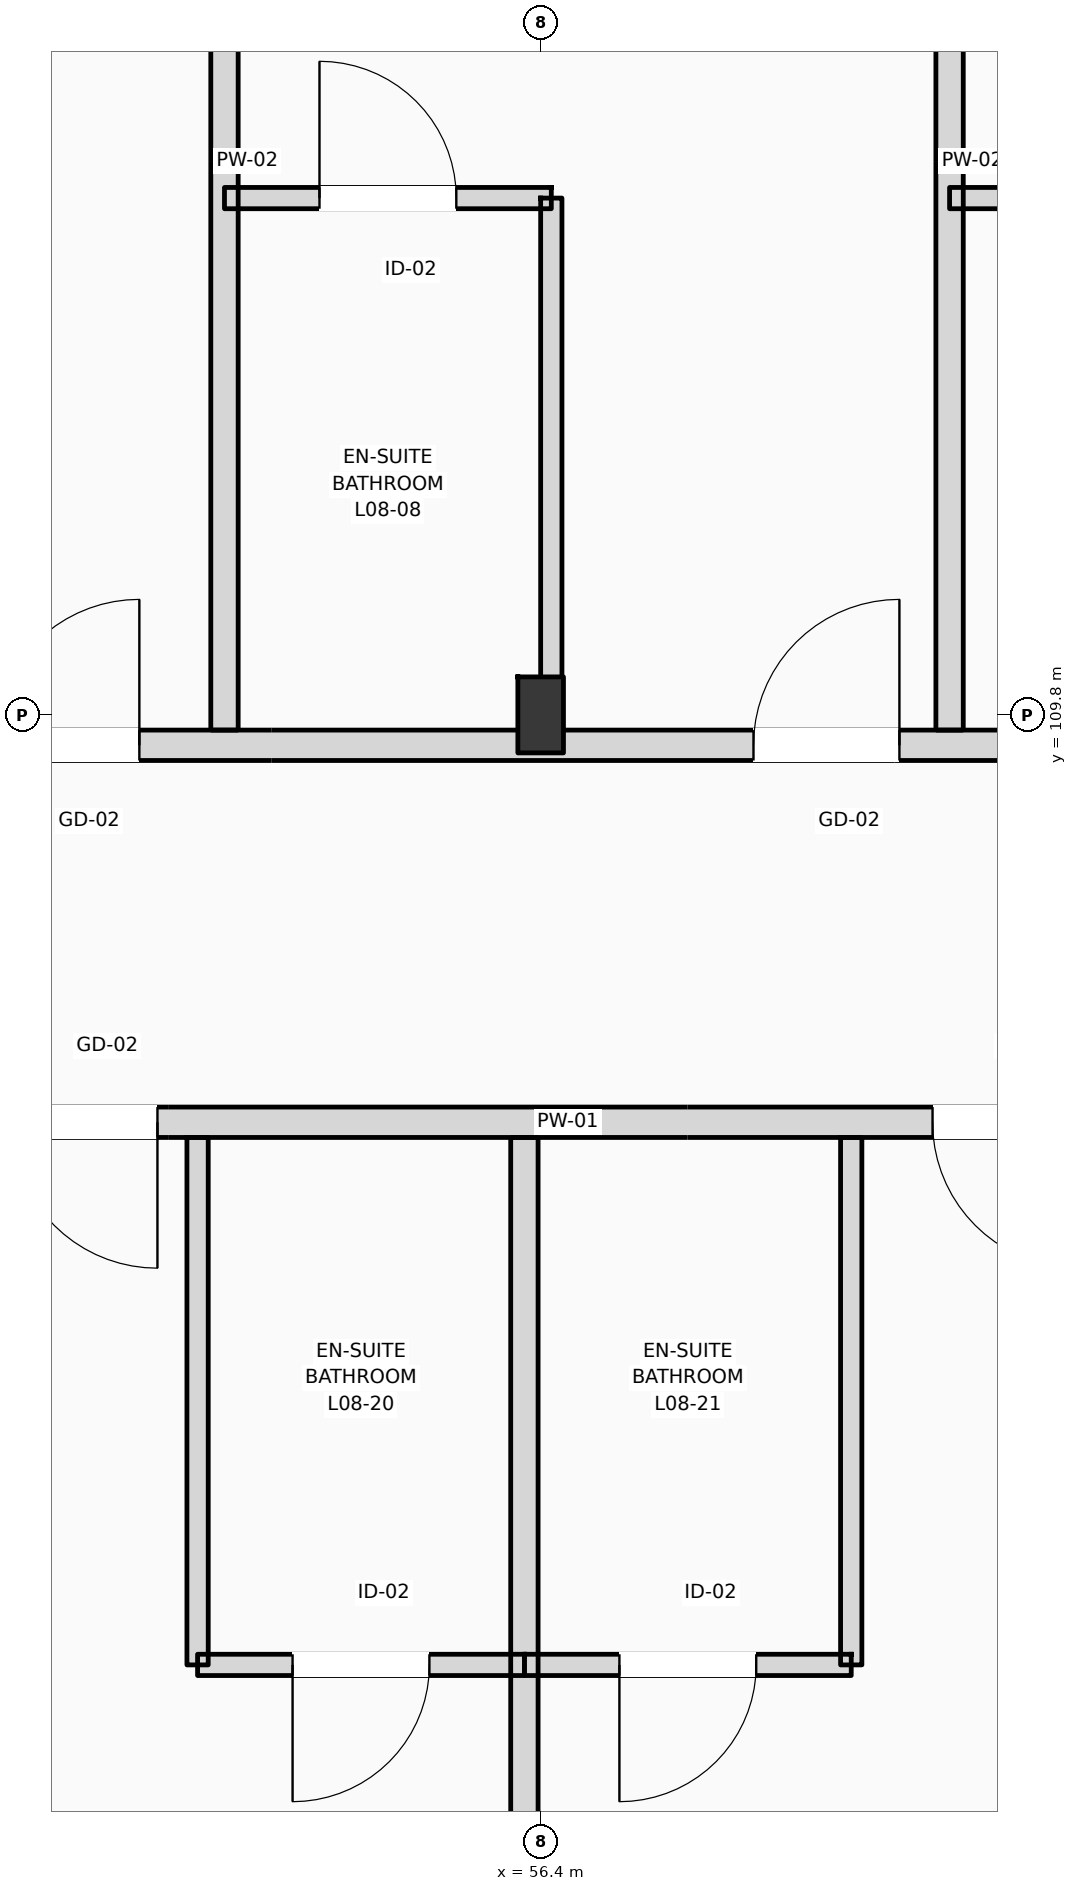
"""IFC4 building model, lengths in metres.
Left out: names, types, materials, properties, quantities, classifications, styles, units other than length and angle.
Written with IfcOpenShell. Run it as: python <this file> out.ifc"""

import sys

from ifc_helpers import new_model, si_unit, direction, frame, frame_2d, origin, origin_2d, place, context, subcontext, project, spatial, rectangle, i_section, extrude, element, fill, save


model = new_model("IFC4")
c1 = context("Model", 3, precision=1e-05, world=origin(), true_north=direction((0.0, 1.0)))
c2 = subcontext(c1, "Body", "Model", "MODEL_VIEW")
j1 = project(units=[si_unit("LENGTHUNIT", "METRE"), si_unit("PLANEANGLEUNIT", "RADIAN")], contexts=[c1])
p1 = place(None, origin())
s1 = spatial("IfcSite", under=j1, at=p1, CompositionType="ELEMENT")
p2 = place(p1, origin())
s2 = spatial("IfcBuilding", under=s1, at=p2, CompositionType="ELEMENT")
p3 = place(p2, frame((0.0, 0.0, 35.4)))
s3 = spatial("IfcBuildingStorey", under=s2, at=p3, CompositionType="ELEMENT", Elevation=35.4)
p4 = place(p3, frame((56.4, 109.8, 0.0), z_axis=(0.0, 0.0, 1.0), x_axis=(1.0, 0.0, 0.0)))
e1 = element("IfcColumn", 1, at=p4, inside=s3, PredefinedType="COLUMN", context=c2, shape_type="SweptSolid", body=[
    extrude(i_section(OverallWidth=0.3, OverallDepth=0.5, WebThickness=0.014, FlangeThickness=0.028, FilletRadius=0.027, at=origin_2d()), origin(), (0.0, 0.0, 1.0), 3.6),
])
p5 = place(p3, frame((10.65, 109.6, 0.0), z_axis=(0.0, 0.0, 1.0), x_axis=(1.0, 0.0, 0.0)))
e2 = element("IfcWall", 2, at=p5, inside=s3, PredefinedType="PARTITIONING", context=c2, shape_type="SweptSolid", body=[
    extrude(rectangle(XDim=84.61, YDim=0.2, at=frame_2d((42.305, 0.0))), origin(), (0.0, 0.0, 1.0), 2.82),
])
p6 = place(p5, frame((12.675, 0.0, 0.0)))
e3 = element("IfcOpeningElement", 3, at=p6, cuts=e2, PredefinedType="OPENING", context=c2, shape_type="SweptSolid", body=[
    extrude(rectangle(XDim=1.02, YDim=2.2, at=frame_2d((0.51, 1.1))), frame((0.0, 0.11, 0.0), z_axis=(0.0, -1.0, 0.0), x_axis=(1.0, 0.0, 0.0)), (0.0, 0.0, 1.0), 0.22),
])
p7 = place(p5, frame((19.62, 0.0, 0.0)))
e4 = element("IfcOpeningElement", 4, at=p7, cuts=e2, PredefinedType="OPENING", context=c2, shape_type="SweptSolid", body=[
    extrude(rectangle(XDim=1.02, YDim=2.2, at=frame_2d((0.51, 1.1))), frame((0.0, 0.11, 0.0), z_axis=(0.0, -1.0, 0.0), x_axis=(1.0, 0.0, 0.0)), (0.0, 0.0, 1.0), 0.22),
])
p8 = place(p5, frame((24.12, 0.0, 0.0)))
e5 = element("IfcOpeningElement", 5, at=p8, cuts=e2, PredefinedType="OPENING", context=c2, shape_type="SweptSolid", body=[
    extrude(rectangle(XDim=1.02, YDim=2.2, at=frame_2d((0.51, 1.1))), frame((0.0, 0.11, 0.0), z_axis=(0.0, -1.0, 0.0), x_axis=(1.0, 0.0, 0.0)), (0.0, 0.0, 1.0), 0.22),
])
p9 = place(p5, frame((26.47, 0.0, 0.0)))
e6 = element("IfcOpeningElement", 6, at=p9, cuts=e2, PredefinedType="OPENING", context=c2, shape_type="SweptSolid", body=[
    extrude(rectangle(XDim=1.02, YDim=2.2, at=frame_2d((0.51, 1.1))), frame((0.0, 0.11, 0.0), z_axis=(0.0, -1.0, 0.0), x_axis=(1.0, 0.0, 0.0)), (0.0, 0.0, 1.0), 0.22),
])
p10 = place(p5, frame((33.15, 0.0, 0.0)))
e7 = element("IfcOpeningElement", 7, at=p10, cuts=e2, PredefinedType="OPENING", context=c2, shape_type="SweptSolid", body=[
    extrude(rectangle(XDim=0.96, YDim=2.2, at=frame_2d((0.48, 1.1))), frame((0.0, 0.11, 0.0), z_axis=(0.0, -1.0, 0.0), x_axis=(1.0, 0.0, 0.0)), (0.0, 0.0, 1.0), 0.22),
])
p11 = place(p5, frame((35.5, 0.0, 0.0)))
e8 = element("IfcOpeningElement", 8, at=p11, cuts=e2, PredefinedType="OPENING", context=c2, shape_type="SweptSolid", body=[
    extrude(rectangle(XDim=0.96, YDim=2.2, at=frame_2d((0.48, 1.1))), frame((0.0, 0.11, 0.0), z_axis=(0.0, -1.0, 0.0), x_axis=(1.0, 0.0, 0.0)), (0.0, 0.0, 1.0), 0.22),
])
p12 = place(p5, frame((42.15, 0.0, 0.0)))
e9 = element("IfcOpeningElement", 9, at=p12, cuts=e2, PredefinedType="OPENING", context=c2, shape_type="SweptSolid", body=[
    extrude(rectangle(XDim=0.96, YDim=2.2, at=frame_2d((0.48, 1.1))), frame((0.0, 0.11, 0.0), z_axis=(0.0, -1.0, 0.0), x_axis=(1.0, 0.0, 0.0)), (0.0, 0.0, 1.0), 0.22),
])
p13 = place(p5, frame((47.15, 0.0, 0.0)))
e10 = element("IfcOpeningElement", 10, at=p13, cuts=e2, PredefinedType="OPENING", context=c2, shape_type="SweptSolid", body=[
    extrude(rectangle(XDim=0.96, YDim=2.2, at=frame_2d((0.48, 1.1))), frame((0.0, 0.11, 0.0), z_axis=(0.0, -1.0, 0.0), x_axis=(1.0, 0.0, 0.0)), (0.0, 0.0, 1.0), 0.22),
])
p14 = place(p5, frame((51.15, 0.0, 0.0)))
e11 = element("IfcOpeningElement", 11, at=p14, cuts=e2, PredefinedType="OPENING", context=c2, shape_type="SweptSolid", body=[
    extrude(rectangle(XDim=0.96, YDim=2.2, at=frame_2d((0.48, 1.1))), frame((0.0, 0.11, 0.0), z_axis=(0.0, -1.0, 0.0), x_axis=(1.0, 0.0, 0.0)), (0.0, 0.0, 1.0), 0.22),
])
p15 = place(p5, frame((55.65, 0.0, 0.0)))
e12 = element("IfcOpeningElement", 12, at=p15, cuts=e2, PredefinedType="OPENING", context=c2, shape_type="SweptSolid", body=[
    extrude(rectangle(XDim=0.96, YDim=2.2, at=frame_2d((0.48, 1.1))), frame((0.0, 0.11, 0.0), z_axis=(0.0, -1.0, 0.0), x_axis=(1.0, 0.0, 0.0)), (0.0, 0.0, 1.0), 0.22),
])
p16 = place(p5, frame((58.0, 0.0, 0.0)))
e13 = element("IfcOpeningElement", 13, at=p16, cuts=e2, PredefinedType="OPENING", context=c2, shape_type="SweptSolid", body=[
    extrude(rectangle(XDim=0.96, YDim=2.2, at=frame_2d((0.48, 1.1))), frame((0.0, 0.11, 0.0), z_axis=(0.0, -1.0, 0.0), x_axis=(1.0, 0.0, 0.0)), (0.0, 0.0, 1.0), 0.22),
])
p17 = place(p5, frame((64.65, 0.0, 0.0)))
e14 = element("IfcOpeningElement", 14, at=p17, cuts=e2, PredefinedType="OPENING", context=c2, shape_type="SweptSolid", body=[
    extrude(rectangle(XDim=0.96, YDim=2.2, at=frame_2d((0.48, 1.1))), frame((0.0, 0.11, 0.0), z_axis=(0.0, -1.0, 0.0), x_axis=(1.0, 0.0, 0.0)), (0.0, 0.0, 1.0), 0.22),
])
p18 = place(p5, frame((66.75, 0.0, 0.0)))
e15 = element("IfcOpeningElement", 15, at=p18, cuts=e2, PredefinedType="OPENING", context=c2, shape_type="SweptSolid", body=[
    extrude(rectangle(XDim=0.96, YDim=2.2, at=frame_2d((0.48, 1.1))), frame((0.0, 0.11, 0.0), z_axis=(0.0, -1.0, 0.0), x_axis=(1.0, 0.0, 0.0)), (0.0, 0.0, 1.0), 0.22),
])
p19 = place(p5, frame((73.65, 0.0, 0.0)))
e16 = element("IfcOpeningElement", 16, at=p19, cuts=e2, PredefinedType="OPENING", context=c2, shape_type="SweptSolid", body=[
    extrude(rectangle(XDim=0.96, YDim=2.2, at=frame_2d((0.48, 1.1))), frame((0.0, 0.11, 0.0), z_axis=(0.0, -1.0, 0.0), x_axis=(1.0, 0.0, 0.0)), (0.0, 0.0, 1.0), 0.22),
])
p20 = place(p5, frame((78.4, 0.0, 0.0)))
e17 = element("IfcOpeningElement", 17, at=p20, cuts=e2, PredefinedType="OPENING", context=c2, shape_type="SweptSolid", body=[
    extrude(rectangle(XDim=0.96, YDim=2.2, at=frame_2d((0.48, 1.1))), frame((0.0, 0.11, 0.0), z_axis=(0.0, -1.0, 0.0), x_axis=(1.0, 0.0, 0.0)), (0.0, 0.0, 1.0), 0.22),
])
p21 = place(p5, frame((80.455, 0.0, 0.0)))
e18 = element("IfcOpeningElement", 18, at=p21, cuts=e2, PredefinedType="OPENING", context=c2, shape_type="SweptSolid", body=[
    extrude(rectangle(XDim=0.96, YDim=2.2, at=frame_2d((0.48, 1.1))), frame((0.0, 0.11, 0.0), z_axis=(0.0, -1.0, 0.0), x_axis=(1.0, 0.0, 0.0)), (0.0, 0.0, 1.0), 0.22),
])
p22 = place(p5, frame((2.716, 0.0, 0.0)))
e19 = element("IfcOpeningElement", 19, at=p22, cuts=e2, PredefinedType="OPENING", context=c2, shape_type="SweptSolid", body=[
    extrude(rectangle(XDim=1.35, YDim=2.25, at=frame_2d((0.675, 1.125))), frame((0.0, 0.11, 0.0), z_axis=(0.0, -1.0, 0.0), x_axis=(1.0, 0.0, 0.0)), (0.0, 0.0, 1.0), 0.22),
])
p23 = place(p5, frame((6.65, 0.0, 0.0)))
e20 = element("IfcOpeningElement", 20, at=p23, cuts=e2, PredefinedType="OPENING", context=c2, shape_type="SweptSolid", body=[
    extrude(rectangle(XDim=1.35, YDim=2.25, at=frame_2d((0.675, 1.125))), frame((0.0, 0.11, 0.0), z_axis=(0.0, -1.0, 0.0), x_axis=(1.0, 0.0, 0.0)), (0.0, 0.0, 1.0), 0.22),
])
p24 = place(p5, frame((10.583, 0.0, 0.0)))
e21 = element("IfcOpeningElement", 21, at=p24, cuts=e2, PredefinedType="OPENING", context=c2, shape_type="SweptSolid", body=[
    extrude(rectangle(XDim=1.35, YDim=2.25, at=frame_2d((0.675, 1.125))), frame((0.0, 0.11, 0.0), z_axis=(0.0, -1.0, 0.0), x_axis=(1.0, 0.0, 0.0)), (0.0, 0.0, 1.0), 0.22),
])
p25 = place(p3, frame((40.76, 107.12, 0.0), z_axis=(0.0, 0.0, 1.0), x_axis=(1.0, 0.0, 0.0)))
e22 = element("IfcWall", 22, at=p25, inside=s3, PredefinedType="PARTITIONING", context=c2, shape_type="SweptSolid", body=[
    extrude(rectangle(XDim=23.44, YDim=0.2, at=frame_2d((11.72, 0.0))), origin(), (0.0, 0.0, 1.0), 3.38),
])
p26 = place(p25, frame((2.629, 0.0, 0.0)))
e23 = element("IfcOpeningElement", 23, at=p26, cuts=e22, PredefinedType="OPENING", context=c2, shape_type="SweptSolid", body=[
    extrude(rectangle(XDim=0.96, YDim=2.2, at=frame_2d((0.48, 1.1))), frame((0.0, 0.11, 0.0), z_axis=(0.0, -1.0, 0.0), x_axis=(1.0, 0.0, 0.0)), (0.0, 0.0, 1.0), 0.22),
])
p27 = place(p25, frame((4.343, 0.0, 0.0)))
e24 = element("IfcOpeningElement", 24, at=p27, cuts=e22, PredefinedType="OPENING", context=c2, shape_type="SweptSolid", body=[
    extrude(rectangle(XDim=0.96, YDim=2.2, at=frame_2d((0.48, 1.1))), frame((0.0, 0.11, 0.0), z_axis=(0.0, -1.0, 0.0), x_axis=(1.0, 0.0, 0.0)), (0.0, 0.0, 1.0), 0.22),
])
p28 = place(p25, frame((10.401, 0.0, 0.0)))
e25 = element("IfcOpeningElement", 25, at=p28, cuts=e22, PredefinedType="OPENING", context=c2, shape_type="SweptSolid", body=[
    extrude(rectangle(XDim=0.96, YDim=2.2, at=frame_2d((0.48, 1.1))), frame((0.0, 0.11, 0.0), z_axis=(0.0, -1.0, 0.0), x_axis=(1.0, 0.0, 0.0)), (0.0, 0.0, 1.0), 0.22),
])
p29 = place(p25, frame((12.159, 0.0, 0.0)))
e26 = element("IfcOpeningElement", 26, at=p29, cuts=e22, PredefinedType="OPENING", context=c2, shape_type="SweptSolid", body=[
    extrude(rectangle(XDim=0.96, YDim=2.2, at=frame_2d((0.48, 1.1))), frame((0.0, 0.11, 0.0), z_axis=(0.0, -1.0, 0.0), x_axis=(1.0, 0.0, 0.0)), (0.0, 0.0, 1.0), 0.22),
])
p30 = place(p25, frame((18.218, 0.0, 0.0)))
e27 = element("IfcOpeningElement", 27, at=p30, cuts=e22, PredefinedType="OPENING", context=c2, shape_type="SweptSolid", body=[
    extrude(rectangle(XDim=0.96, YDim=2.2, at=frame_2d((0.48, 1.1))), frame((0.0, 0.11, 0.0), z_axis=(0.0, -1.0, 0.0), x_axis=(1.0, 0.0, 0.0)), (0.0, 0.0, 1.0), 0.22),
])
p31 = place(p25, frame((20.021, 0.0, 0.0)))
e28 = element("IfcOpeningElement", 28, at=p31, cuts=e22, PredefinedType="OPENING", context=c2, shape_type="SweptSolid", body=[
    extrude(rectangle(XDim=0.96, YDim=2.2, at=frame_2d((0.48, 1.1))), frame((0.0, 0.11, 0.0), z_axis=(0.0, -1.0, 0.0), x_axis=(1.0, 0.0, 0.0)), (0.0, 0.0, 1.0), 0.22),
])
p32 = place(p3, frame((54.32, 109.7, 0.0), z_axis=(0.0, 0.0, 1.0), x_axis=(0.0, 1.0, 0.0)))
e29 = element("IfcWall", 29, at=p32, inside=s3, PredefinedType="PARTITIONING", context=c2, shape_type="SweptSolid", body=[
    extrude(rectangle(XDim=8.15, YDim=0.18, at=frame_2d((4.075, 0.0))), origin(), (0.0, 0.0, 1.0), 3.38),
])
p33 = place(p3, frame((59.09, 109.7, 0.0), z_axis=(0.0, 0.0, 1.0), x_axis=(0.0, 1.0, 0.0)))
e30 = element("IfcWall", 30, at=p33, inside=s3, PredefinedType="PARTITIONING", context=c2, shape_type="SweptSolid", body=[
    extrude(rectangle(XDim=8.15, YDim=0.18, at=frame_2d((4.075, 0.0))), origin(), (0.0, 0.0, 1.0), 3.07),
])
p34 = place(p3, frame((56.47, 109.7, 0.0), z_axis=(0.0, 0.0, 1.0), x_axis=(0.0, 1.0, 0.0)))
e31 = element("IfcWall", 31, at=p34, inside=s3, PredefinedType="PARTITIONING", context=c2, shape_type="SweptSolid", body=[
    extrude(rectangle(XDim=3.5, YDim=0.14, at=frame_2d((1.75, 0.0))), origin(), (0.0, 0.0, 1.0), 3.01),
])
p35 = place(p3, frame((54.32, 113.2, 0.0), z_axis=(0.0, 0.0, 1.0), x_axis=(1.0, 0.0, 0.0)))
e32 = element("IfcWall", 32, at=p35, inside=s3, PredefinedType="PARTITIONING", context=c2, shape_type="SweptSolid", body=[
    extrude(rectangle(XDim=2.15, YDim=0.14, at=frame_2d((1.075, 0.0))), origin(), (0.0, 0.0, 1.0), 3.38),
])
p36 = place(p35, frame((0.625, 0.0, 0.0)))
e33 = element("IfcOpeningElement", 33, at=p36, cuts=e32, PredefinedType="OPENING", context=c2, shape_type="SweptSolid", body=[
    extrude(rectangle(XDim=0.9, YDim=2.1, at=frame_2d((0.45, 1.05))), frame((0.0, 0.08, 0.0), z_axis=(0.0, -1.0, 0.0), x_axis=(1.0, 0.0, 0.0)), (0.0, 0.0, 1.0), 0.16),
])
p37 = place(p3, frame((59.09, 113.2, 0.0), z_axis=(0.0, 0.0, 1.0), x_axis=(1.0, 0.0, 0.0)))
e34 = element("IfcWall", 34, at=p37, inside=s3, PredefinedType="PARTITIONING", context=c2, shape_type="SweptSolid", body=[
    extrude(rectangle(XDim=2.15, YDim=0.14, at=frame_2d((1.075, 0.0))), origin(), (0.0, 0.0, 1.0), 3.38),
])
p38 = place(p37, frame((0.625, 0.0, 0.0)))
e35 = element("IfcOpeningElement", 35, at=p38, cuts=e34, PredefinedType="OPENING", context=c2, shape_type="SweptSolid", body=[
    extrude(rectangle(XDim=0.9, YDim=2.1, at=frame_2d((0.45, 1.05))), frame((0.0, 0.08, 0.0), z_axis=(0.0, -1.0, 0.0), x_axis=(1.0, 0.0, 0.0)), (0.0, 0.0, 1.0), 0.16),
])
p39 = place(p3, frame((56.293, 96.14, 0.0), z_axis=(0.0, 0.0, 1.0), x_axis=(0.0, 1.0, 0.0)))
e36 = element("IfcWall", 36, at=p39, inside=s3, PredefinedType="PARTITIONING", context=c2, shape_type="SweptSolid", body=[
    extrude(rectangle(XDim=10.88, YDim=0.18, at=frame_2d((5.44, 0.0))), origin(), (0.0, 0.0, 1.0), 3.01),
])
p40 = place(p3, frame((54.143, 103.55, 0.0), z_axis=(0.0, 0.0, 1.0), x_axis=(0.0, 1.0, 0.0)))
e37 = element("IfcWall", 37, at=p40, inside=s3, PredefinedType="PARTITIONING", context=c2, shape_type="SweptSolid", body=[
    extrude(rectangle(XDim=3.47, YDim=0.14, at=frame_2d((1.735, 0.0))), origin(), (0.0, 0.0, 1.0), 3.38),
])
p41 = place(p3, frame((54.143, 103.55, 0.0), z_axis=(0.0, 0.0, 1.0), x_axis=(1.0, 0.0, 0.0)))
e38 = element("IfcWall", 38, at=p41, inside=s3, PredefinedType="PARTITIONING", context=c2, shape_type="SweptSolid", body=[
    extrude(rectangle(XDim=2.15, YDim=0.14, at=frame_2d((1.075, 0.0))), origin(), (0.0, 0.0, 1.0), 3.38),
])
p42 = place(p41, frame((0.625, 0.0, 0.0)))
e39 = element("IfcOpeningElement", 39, at=p42, cuts=e38, PredefinedType="OPENING", context=c2, shape_type="SweptSolid", body=[
    extrude(rectangle(XDim=0.9, YDim=2.1, at=frame_2d((0.45, 1.05))), frame((0.0, 0.08, 0.0), z_axis=(0.0, -1.0, 0.0), x_axis=(1.0, 0.0, 0.0)), (0.0, 0.0, 1.0), 0.16),
])
p43 = place(p3, frame((58.443, 103.55, 0.0), z_axis=(0.0, 0.0, 1.0), x_axis=(0.0, 1.0, 0.0)))
e40 = element("IfcWall", 40, at=p43, inside=s3, PredefinedType="PARTITIONING", context=c2, shape_type="SweptSolid", body=[
    extrude(rectangle(XDim=3.47, YDim=0.14, at=frame_2d((1.735, 0.0))), origin(), (0.0, 0.0, 1.0), 3.38),
])
p44 = place(p3, frame((56.293, 103.55, 0.0), z_axis=(0.0, 0.0, 1.0), x_axis=(1.0, 0.0, 0.0)))
e41 = element("IfcWall", 41, at=p44, inside=s3, PredefinedType="PARTITIONING", context=c2, shape_type="SweptSolid", body=[
    extrude(rectangle(XDim=2.15, YDim=0.14, at=frame_2d((1.075, 0.0))), origin(), (0.0, 0.0, 1.0), 3.38),
])
p45 = place(p44, frame((0.625, 0.0, 0.0)))
e42 = element("IfcOpeningElement", 42, at=p45, cuts=e41, PredefinedType="OPENING", context=c2, shape_type="SweptSolid", body=[
    extrude(rectangle(XDim=0.9, YDim=2.1, at=frame_2d((0.45, 1.05))), frame((0.0, 0.08, 0.0), z_axis=(0.0, -1.0, 0.0), x_axis=(1.0, 0.0, 0.0)), (0.0, 0.0, 1.0), 0.16),
])
p46 = place(p12, origin())
e43 = element("IfcDoor", 43, at=p46, inside=s3, OperationType="SINGLE_SWING_RIGHT", PredefinedType="DOOR", context=c2, shape_type="SweptSolid", body=[
    extrude(rectangle(XDim=0.96, YDim=2.2, at=frame_2d((0.48, 1.1))), frame((0.0, 0.025, 0.0), z_axis=(0.0, -1.0, 0.0), x_axis=(1.0, 0.0, 0.0)), (0.0, 0.0, 1.0), 0.05),
])
fill(e9, e43)
p47 = place(p13, origin())
e44 = element("IfcDoor", 44, at=p47, inside=s3, OperationType="SINGLE_SWING_RIGHT", PredefinedType="DOOR", context=c2, shape_type="SweptSolid", body=[
    extrude(rectangle(XDim=0.96, YDim=2.2, at=frame_2d((0.48, 1.1))), frame((0.0, 0.025, 0.0), z_axis=(0.0, -1.0, 0.0), x_axis=(1.0, 0.0, 0.0)), (0.0, 0.0, 1.0), 0.05),
])
fill(e10, e44)
p48 = place(p36, origin())
e45 = element("IfcDoor", 45, at=p48, inside=s3, OperationType="SINGLE_SWING_LEFT", PredefinedType="DOOR", context=c2, shape_type="SweptSolid", body=[
    extrude(rectangle(XDim=0.9, YDim=2.1, at=frame_2d((0.45, 1.05))), frame((0.0, 0.025, 0.0), z_axis=(0.0, -1.0, 0.0), x_axis=(1.0, 0.0, 0.0)), (0.0, 0.0, 1.0), 0.05),
])
fill(e33, e45)
p49 = place(p29, frame((0.96, 0.0, 0.0), z_axis=(0.0, 0.0, 1.0), x_axis=(-1.0, 0.0, 0.0)))
e46 = element("IfcDoor", 46, at=p49, inside=s3, OperationType="SINGLE_SWING_RIGHT", PredefinedType="DOOR", context=c2, shape_type="SweptSolid", body=[
    extrude(rectangle(XDim=0.96, YDim=2.2, at=frame_2d((0.48, 1.1))), frame((0.0, 0.025, 0.0), z_axis=(0.0, -1.0, 0.0), x_axis=(1.0, 0.0, 0.0)), (0.0, 0.0, 1.0), 0.05),
])
fill(e26, e46)
p50 = place(p42, frame((0.9, 0.0, 0.0), z_axis=(0.0, 0.0, 1.0), x_axis=(-1.0, 0.0, 0.0)))
e47 = element("IfcDoor", 47, at=p50, inside=s3, OperationType="SINGLE_SWING_LEFT", PredefinedType="DOOR", context=c2, shape_type="SweptSolid", body=[
    extrude(rectangle(XDim=0.9, YDim=2.1, at=frame_2d((0.45, 1.05))), frame((0.0, 0.025, 0.0), z_axis=(0.0, -1.0, 0.0), x_axis=(1.0, 0.0, 0.0)), (0.0, 0.0, 1.0), 0.05),
])
fill(e39, e47)
p51 = place(p30, frame((0.96, 0.0, 0.0), z_axis=(0.0, 0.0, 1.0), x_axis=(-1.0, 0.0, 0.0)))
e48 = element("IfcDoor", 48, at=p51, inside=s3, OperationType="SINGLE_SWING_RIGHT", PredefinedType="DOOR", context=c2, shape_type="SweptSolid", body=[
    extrude(rectangle(XDim=0.96, YDim=2.2, at=frame_2d((0.48, 1.1))), frame((0.0, 0.025, 0.0), z_axis=(0.0, -1.0, 0.0), x_axis=(1.0, 0.0, 0.0)), (0.0, 0.0, 1.0), 0.05),
])
fill(e27, e48)
p52 = place(p45, frame((0.9, 0.0, 0.0), z_axis=(0.0, 0.0, 1.0), x_axis=(-1.0, 0.0, 0.0)))
e49 = element("IfcDoor", 49, at=p52, inside=s3, OperationType="SINGLE_SWING_LEFT", PredefinedType="DOOR", context=c2, shape_type="SweptSolid", body=[
    extrude(rectangle(XDim=0.9, YDim=2.1, at=frame_2d((0.45, 1.05))), frame((0.0, 0.025, 0.0), z_axis=(0.0, -1.0, 0.0), x_axis=(1.0, 0.0, 0.0)), (0.0, 0.0, 1.0), 0.05),
])
fill(e42, e49)
save(model, sys.argv[1])
